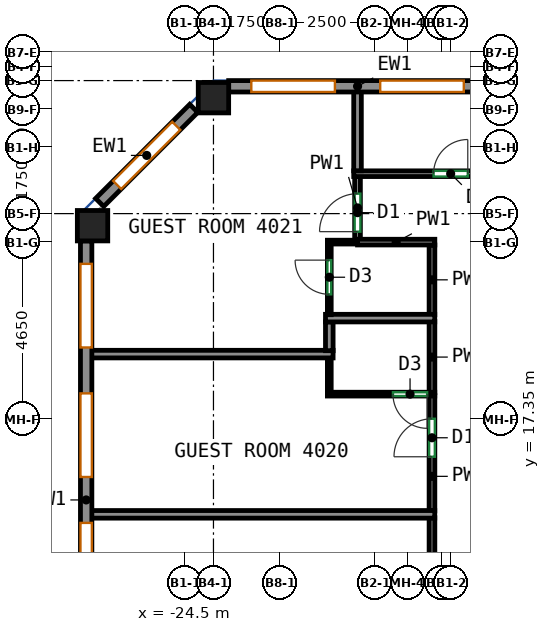
"""IFC4 building model, lengths in metres.
Left out: names, types, materials, properties, quantities, classifications, styles, units other than length and angle.
Written with IfcOpenShell. Run it as: python <this file> out.ifc"""

import sys

from ifc_helpers import new_model, si_unit, direction, frame, frame_2d, origin, origin_2d, place, context, subcontext, project, spatial, rectangle, extrude, source, transform, mapped, element, fill, save


model = new_model("IFC4")
c1 = context("Model", 3, precision=1e-05, world=origin(), true_north=direction((0.0, 1.0)))
c2 = subcontext(c1, "Body", "Model", "MODEL_VIEW")
j1 = project(units=[si_unit("LENGTHUNIT", "METRE"), si_unit("PLANEANGLEUNIT", "RADIAN")], contexts=[c1])
p1 = place(None, origin())
s1 = spatial("IfcSite", under=j1, at=p1, CompositionType="ELEMENT")
p2 = place(p1, origin())
s2 = spatial("IfcBuilding", under=s1, at=p2, CompositionType="ELEMENT")
p3 = place(p2, frame((0.0, 0.0, 171.9)))
s3 = spatial("IfcBuildingStorey", under=s2, at=p3, CompositionType="ELEMENT", Elevation=171.9)
m1 = source(origin(), c2, "Body", "SweptSolid", [
    extrude(rectangle(XDim=0.8, YDim=0.8, at=origin_2d()), origin(), (0.0, 0.0, 1.0), 3.12),
])
for number, where, z_axis, x_axis in (
    (1, (-26.932, 22.432, 0.0), (0.0, 0.0, 1.0), (1.0, 0.0, 0.0)),
    (2, (-23.75, 25.8, 0.0), (0.0, 0.0, 1.0), (1.0, 0.0, 0.0)),
):
    element("IfcColumn", number, at=place(p3, frame(where, z_axis=z_axis, x_axis=x_axis)), inside=s3, PredefinedType="COLUMN", context=c2, shape_type="MappedRepresentation", body=[
        mapped(m1, transform((0.0, 0.0, 0.0))),
    ])
m2 = source(origin(), c2, "Body", "SweptSolid", [
    extrude(rectangle(XDim=6.783, YDim=0.3, at=frame_2d((3.392, 0.0))), origin(), (0.0, 0.0, 1.0), 3.12),
])
p4 = place(p3, frame((-16.567, 26.1, 0.0), z_axis=(0.0, 0.0, 1.0), x_axis=(-1.0, 0.0, 0.0)))
e3 = element("IfcWall", 3, at=p4, inside=s3, PredefinedType="SOLIDWALL", context=c2, shape_type="MappedRepresentation", body=[
    mapped(m2, transform((0.0, 0.0, 0.0))),
])
p5 = place(p4, frame((0.596, 0.0, 0.85)))
e4 = element("IfcOpeningElement", 4, at=p5, cuts=e3, PredefinedType="OPENING", context=c2, shape_type="SweptSolid", body=[
    extrude(rectangle(XDim=2.2, YDim=1.95, at=frame_2d((1.1, 0.975))), frame((0.0, 0.16, 0.0), z_axis=(0.0, -1.0, 0.0), x_axis=(1.0, 0.0, 0.0)), (0.0, 0.0, 1.0), 0.32),
])
p6 = place(p4, frame((3.988, 0.0, 0.85)))
e5 = element("IfcOpeningElement", 5, at=p6, cuts=e3, PredefinedType="OPENING", context=c2, shape_type="SweptSolid", body=[
    extrude(rectangle(XDim=2.2, YDim=1.95, at=frame_2d((1.1, 0.975))), frame((0.0, 0.16, 0.0), z_axis=(0.0, -1.0, 0.0), x_axis=(1.0, 0.0, 0.0)), (0.0, 0.0, 1.0), 0.32),
])
m3 = source(origin(), c2, "Body", "SweptSolid", [
    extrude(rectangle(XDim=3.5, YDim=0.3, at=frame_2d((1.75, 0.0))), origin(), (0.0, 0.0, 1.0), 3.12),
])
p7 = place(p3, frame((-24.269, 25.519, 0.0), z_axis=(0.0, 0.0, 1.0), x_axis=(-0.707141656123, -0.70707190453, 0.0)))
e6 = element("IfcWall", 6, at=p7, inside=s3, PredefinedType="SOLIDWALL", context=c2, shape_type="MappedRepresentation", body=[
    mapped(m3, transform((0.0, 0.0, 0.0))),
])
p8 = place(p7, frame((0.65, 0.0, 0.85)))
e7 = element("IfcOpeningElement", 7, at=p8, cuts=e6, PredefinedType="OPENING", context=c2, shape_type="SweptSolid", body=[
    extrude(rectangle(XDim=2.2, YDim=1.95, at=frame_2d((1.1, 0.975))), frame((0.0, 0.16, 0.0), z_axis=(0.0, -1.0, 0.0), x_axis=(1.0, 0.0, 0.0)), (0.0, 0.0, 1.0), 0.32),
])
m4 = source(origin(), c2, "Body", "SweptSolid", [
    extrude(rectangle(XDim=13.632, YDim=0.3, at=frame_2d((6.816, 0.0))), origin(), (0.0, 0.0, 1.0), 3.12),
])
p9 = place(p3, frame((-27.1, 22.032, 0.0), z_axis=(0.0, 0.0, 1.0), x_axis=(0.0, -1.0, 0.0)))
e8 = element("IfcWall", 8, at=p9, inside=s3, PredefinedType="SOLIDWALL", context=c2, shape_type="MappedRepresentation", body=[
    mapped(m4, transform((0.0, 0.0, 0.0))),
])
p10 = place(p9, frame((0.604, 0.0, 0.85)))
e9 = element("IfcOpeningElement", 9, at=p10, cuts=e8, PredefinedType="OPENING", context=c2, shape_type="SweptSolid", body=[
    extrude(rectangle(XDim=2.2, YDim=1.95, at=frame_2d((1.1, 0.975))), frame((0.0, 0.16, 0.0), z_axis=(0.0, -1.0, 0.0), x_axis=(1.0, 0.0, 0.0)), (0.0, 0.0, 1.0), 0.32),
])
p11 = place(p9, frame((4.012, 0.0, 0.85)))
e10 = element("IfcOpeningElement", 10, at=p11, cuts=e8, PredefinedType="OPENING", context=c2, shape_type="SweptSolid", body=[
    extrude(rectangle(XDim=2.2, YDim=1.95, at=frame_2d((1.1, 0.975))), frame((0.0, 0.16, 0.0), z_axis=(0.0, -1.0, 0.0), x_axis=(1.0, 0.0, 0.0)), (0.0, 0.0, 1.0), 0.32),
])
p12 = place(p9, frame((7.42, 0.0, 0.85)))
e11 = element("IfcOpeningElement", 11, at=p12, cuts=e8, PredefinedType="OPENING", context=c2, shape_type="SweptSolid", body=[
    extrude(rectangle(XDim=2.2, YDim=1.95, at=frame_2d((1.1, 0.975))), frame((0.0, 0.16, 0.0), z_axis=(0.0, -1.0, 0.0), x_axis=(1.0, 0.0, 0.0)), (0.0, 0.0, 1.0), 0.32),
])
p13 = place(p9, frame((10.828, 0.0, 0.85)))
e12 = element("IfcOpeningElement", 12, at=p13, cuts=e8, PredefinedType="OPENING", context=c2, shape_type="SweptSolid", body=[
    extrude(rectangle(XDim=2.2, YDim=1.95, at=frame_2d((1.1, 0.975))), frame((0.0, 0.16, 0.0), z_axis=(0.0, -1.0, 0.0), x_axis=(1.0, 0.0, 0.0)), (0.0, 0.0, 1.0), 0.32),
])
p14 = place(p3, frame((-18.0, 10.04, 0.0), z_axis=(0.0, 0.0, 1.0), x_axis=(0.0, 1.0, 0.0)))
e13 = element("IfcWall", 13, at=p14, inside=s3, PredefinedType="PARTITIONING", context=c2, shape_type="SweptSolid", body=[
    extrude(rectangle(XDim=4.707, YDim=0.15, at=frame_2d((2.354, 0.0))), origin(), (0.0, 0.0, 1.0), 3.12),
])
p15 = place(p14, frame((0.501, 0.0, 0.0)))
e14 = element("IfcOpeningElement", 14, at=p15, cuts=e13, PredefinedType="OPENING", context=c2, shape_type="SweptSolid", body=[
    extrude(rectangle(XDim=1.0, YDim=2.1, at=frame_2d((0.5, 1.05))), frame((0.0, 0.085, 0.0), z_axis=(0.0, -1.0, 0.0), x_axis=(1.0, 0.0, 0.0)), (0.0, 0.0, 1.0), 0.17),
])
p16 = place(p3, frame((-18.0, 14.927, 0.0), z_axis=(0.0, 0.0, 1.0), x_axis=(0.0, 1.0, 0.0)))
e15 = element("IfcWall", 15, at=p16, inside=s3, PredefinedType="PARTITIONING", context=c2, shape_type="SweptSolid", body=[
    extrude(rectangle(XDim=3.033, YDim=0.15, at=frame_2d((1.517, 0.0))), origin(), (0.0, 0.0, 1.0), 3.12),
])
p17 = place(p16, frame((1.425, 0.0, 0.0)))
e16 = element("IfcOpeningElement", 16, at=p17, cuts=e15, PredefinedType="OPENING", context=c2, shape_type="SweptSolid", body=[
    extrude(rectangle(XDim=1.0, YDim=2.1, at=frame_2d((0.5, 1.05))), frame((0.0, 0.085, 0.0), z_axis=(0.0, -1.0, 0.0), x_axis=(1.0, 0.0, 0.0)), (0.0, 0.0, 1.0), 0.17),
])
p18 = place(p3, frame((-18.0, 18.04, 0.0), z_axis=(0.0, 0.0, 1.0), x_axis=(0.0, 1.0, 0.0)))
e17 = element("IfcWall", 17, at=p18, inside=s3, PredefinedType="PARTITIONING", context=c2, shape_type="SweptSolid", body=[
    extrude(rectangle(XDim=1.87, YDim=0.15, at=frame_2d((0.935, 0.0))), origin(), (0.0, 0.0, 1.0), 3.12),
])
p19 = place(p3, frame((-19.959, 22.075, 0.0), z_axis=(0.0, 0.0, 1.0), x_axis=(0.0, 1.0, 0.0)))
e18 = element("IfcWall", 18, at=p19, inside=s3, PredefinedType="PARTITIONING", context=c2, shape_type="SweptSolid", body=[
    extrude(rectangle(XDim=1.65, YDim=0.15, at=frame_2d((0.825, 0.0))), origin(), (0.0, 0.0, 1.0), 3.12),
])
p20 = place(p19, frame((0.2, 0.0, 0.0)))
e19 = element("IfcOpeningElement", 19, at=p20, cuts=e18, PredefinedType="OPENING", context=c2, shape_type="SweptSolid", body=[
    extrude(rectangle(XDim=1.0, YDim=2.1, at=frame_2d((0.5, 1.05))), frame((0.0, 0.085, 0.0), z_axis=(0.0, -1.0, 0.0), x_axis=(1.0, 0.0, 0.0)), (0.0, 0.0, 1.0), 0.17),
])
p21 = place(p3, frame((-18.0, 20.09, 0.0), z_axis=(0.0, 0.0, 1.0), x_axis=(0.0, 1.0, 0.0)))
e20 = element("IfcWall", 20, at=p21, inside=s3, PredefinedType="PARTITIONING", context=c2, shape_type="SweptSolid", body=[
    extrude(rectangle(XDim=1.835, YDim=0.15, at=frame_2d((0.917, 0.0))), origin(), (0.0, 0.0, 1.0), 3.12),
])
p22 = place(p3, frame((-19.959, 22.0, 0.0), z_axis=(0.0, 0.0, 1.0), x_axis=(1.0, 0.0, 0.0)))
e21 = element("IfcWall", 21, at=p22, inside=s3, PredefinedType="PARTITIONING", context=c2, shape_type="SweptSolid", body=[
    extrude(rectangle(XDim=2.034, YDim=0.15, at=frame_2d((1.017, 0.0))), origin(), (0.0, 0.0, 1.0), 3.12),
])
p23 = place(p3, frame((-20.059, 23.8, 0.0), z_axis=(0.0, 0.0, 1.0), x_axis=(1.0, 0.0, 0.0)))
e22 = element("IfcWall", 22, at=p23, inside=s3, PredefinedType="PARTITIONING", context=c2, shape_type="SweptSolid", body=[
    extrude(rectangle(XDim=41.909, YDim=0.15, at=frame_2d((20.955, 0.0))), origin(), (0.0, 0.0, 1.0), 3.12),
])
p24 = place(p23, frame((2.101, 0.0, 0.0)))
e23 = element("IfcOpeningElement", 23, at=p24, cuts=e22, PredefinedType="OPENING", context=c2, shape_type="SweptSolid", body=[
    extrude(rectangle(XDim=0.9, YDim=2.1, at=frame_2d((0.45, 1.05))), frame((0.0, 0.085, 0.0), z_axis=(0.0, -1.0, 0.0), x_axis=(1.0, 0.0, 0.0)), (0.0, 0.0, 1.0), 0.17),
])
p25 = place(p23, frame((4.585, 0.0, 0.0)))
e24 = element("IfcOpeningElement", 24, at=p25, cuts=e22, PredefinedType="OPENING", context=c2, shape_type="SweptSolid", body=[
    extrude(rectangle(XDim=1.0, YDim=2.1, at=frame_2d((0.5, 1.05))), frame((0.0, 0.085, 0.0), z_axis=(0.0, -1.0, 0.0), x_axis=(1.0, 0.0, 0.0)), (0.0, 0.0, 1.0), 0.17),
])
p26 = place(p23, frame((8.175, 0.0, 0.0)))
e25 = element("IfcOpeningElement", 25, at=p26, cuts=e22, PredefinedType="OPENING", context=c2, shape_type="SweptSolid", body=[
    extrude(rectangle(XDim=0.9, YDim=2.1, at=frame_2d((0.45, 1.05))), frame((0.0, 0.085, 0.0), z_axis=(0.0, -1.0, 0.0), x_axis=(1.0, 0.0, 0.0)), (0.0, 0.0, 1.0), 0.17),
])
p27 = place(p23, frame((13.173, 0.0, 0.0)))
e26 = element("IfcOpeningElement", 26, at=p27, cuts=e22, PredefinedType="OPENING", context=c2, shape_type="SweptSolid", body=[
    extrude(rectangle(XDim=1.0, YDim=2.1, at=frame_2d((0.5, 1.05))), frame((0.0, 0.085, 0.0), z_axis=(0.0, -1.0, 0.0), x_axis=(1.0, 0.0, 0.0)), (0.0, 0.0, 1.0), 0.17),
])
p28 = place(p23, frame((15.658, 0.0, 0.0)))
e27 = element("IfcOpeningElement", 27, at=p28, cuts=e22, PredefinedType="OPENING", context=c2, shape_type="SweptSolid", body=[
    extrude(rectangle(XDim=0.9, YDim=2.1, at=frame_2d((0.45, 1.05))), frame((0.0, 0.085, 0.0), z_axis=(0.0, -1.0, 0.0), x_axis=(1.0, 0.0, 0.0)), (0.0, 0.0, 1.0), 0.17),
])
p29 = place(p23, frame((21.315, 0.0, 0.0)))
e28 = element("IfcOpeningElement", 28, at=p29, cuts=e22, PredefinedType="OPENING", context=c2, shape_type="SweptSolid", body=[
    extrude(rectangle(XDim=0.9, YDim=2.1, at=frame_2d((0.45, 1.05))), frame((0.0, 0.085, 0.0), z_axis=(0.0, -1.0, 0.0), x_axis=(1.0, 0.0, 0.0)), (0.0, 0.0, 1.0), 0.17),
])
p30 = place(p23, frame((24.625, 0.0, 0.0)))
e29 = element("IfcOpeningElement", 29, at=p30, cuts=e22, PredefinedType="OPENING", context=c2, shape_type="SweptSolid", body=[
    extrude(rectangle(XDim=1.0, YDim=2.1, at=frame_2d((0.5, 1.05))), frame((0.0, 0.085, 0.0), z_axis=(0.0, -1.0, 0.0), x_axis=(1.0, 0.0, 0.0)), (0.0, 0.0, 1.0), 0.17),
])
p31 = place(p23, frame((29.043, 0.0, 0.0)))
e30 = element("IfcOpeningElement", 30, at=p31, cuts=e22, PredefinedType="OPENING", context=c2, shape_type="SweptSolid", body=[
    extrude(rectangle(XDim=0.9, YDim=2.1, at=frame_2d((0.45, 1.05))), frame((0.0, 0.085, 0.0), z_axis=(0.0, -1.0, 0.0), x_axis=(1.0, 0.0, 0.0)), (0.0, 0.0, 1.0), 0.17),
])
p32 = place(p23, frame((32.735, 0.0, 0.0)))
e31 = element("IfcOpeningElement", 31, at=p32, cuts=e22, PredefinedType="OPENING", context=c2, shape_type="SweptSolid", body=[
    extrude(rectangle(XDim=1.0, YDim=2.1, at=frame_2d((0.5, 1.05))), frame((0.0, 0.085, 0.0), z_axis=(0.0, -1.0, 0.0), x_axis=(1.0, 0.0, 0.0)), (0.0, 0.0, 1.0), 0.17),
])
p33 = place(p23, frame((36.627, 0.0, 0.0)))
e32 = element("IfcOpeningElement", 32, at=p33, cuts=e22, PredefinedType="OPENING", context=c2, shape_type="SweptSolid", body=[
    extrude(rectangle(XDim=0.9, YDim=2.1, at=frame_2d((0.45, 1.05))), frame((0.0, 0.085, 0.0), z_axis=(0.0, -1.0, 0.0), x_axis=(1.0, 0.0, 0.0)), (0.0, 0.0, 1.0), 0.17),
])
p34 = place(p23, frame((38.808, 0.0, 0.0)))
e33 = element("IfcOpeningElement", 33, at=p34, cuts=e22, PredefinedType="OPENING", context=c2, shape_type="SweptSolid", body=[
    extrude(rectangle(XDim=0.9, YDim=2.1, at=frame_2d((0.45, 1.05))), frame((0.0, 0.085, 0.0), z_axis=(0.0, -1.0, 0.0), x_axis=(1.0, 0.0, 0.0)), (0.0, 0.0, 1.0), 0.17),
])
p35 = place(p3, frame((-17.927, 14.837, 0.0), z_axis=(0.0, 0.0, 1.0), x_axis=(-1.0, 0.0, 0.0)))
e34 = element("IfcWall", 34, at=p35, inside=s3, PredefinedType="PARTITIONING", context=c2, shape_type="SweptSolid", body=[
    extrude(rectangle(XDim=9.073, YDim=0.2, at=frame_2d((4.537, 0.0))), origin(), (0.0, 0.0, 1.0), 3.12),
])
p36 = place(p3, frame((-17.927, 18.0, 0.0), z_axis=(0.0, 0.0, 1.0), x_axis=(-1.0, 0.0, 0.0)))
e35 = element("IfcWall", 35, at=p36, inside=s3, PredefinedType="PARTITIONING", context=c2, shape_type="SweptSolid", body=[
    extrude(rectangle(XDim=2.825, YDim=0.1, at=frame_2d((1.413, 0.0))), origin(), (0.0, 0.0, 1.0), 3.12),
])
p37 = place(p36, frame((0.2, 0.0, 0.0)))
e36 = element("IfcOpeningElement", 36, at=p37, cuts=e35, PredefinedType="OPENING", context=c2, shape_type="SweptSolid", body=[
    extrude(rectangle(XDim=0.9, YDim=2.1, at=frame_2d((0.45, 1.05))), frame((0.0, 0.06, 0.0), z_axis=(0.0, -1.0, 0.0), x_axis=(1.0, 0.0, 0.0)), (0.0, 0.0, 1.0), 0.12),
])
p38 = place(p3, frame((-20.702, 18.05, 0.0), z_axis=(0.0, 0.0, 1.0), x_axis=(0.0, 1.0, 0.0)))
e37 = element("IfcWall", 37, at=p38, inside=s3, PredefinedType="PARTITIONING", context=c2, shape_type="SweptSolid", body=[
    extrude(rectangle(XDim=0.903, YDim=0.1, at=frame_2d((0.451, 0.0))), origin(), (0.0, 0.0, 1.0), 3.12),
])
p39 = place(p3, frame((-20.602, 19.053, 0.0), z_axis=(0.0, 0.0, 1.0), x_axis=(-1.0, 0.0, 0.0)))
e38 = element("IfcWall", 38, at=p39, inside=s3, PredefinedType="PARTITIONING", context=c2, shape_type="SweptSolid", body=[
    extrude(rectangle(XDim=6.398, YDim=0.2, at=frame_2d((3.199, 0.0))), origin(), (0.0, 0.0, 1.0), 3.12),
])
p40 = place(p3, frame((-20.702, 19.9, 0.0), z_axis=(0.0, 0.0, 1.0), x_axis=(0.0, -1.0, 0.0)))
e39 = element("IfcWall", 39, at=p40, inside=s3, PredefinedType="PARTITIONING", context=c2, shape_type="SweptSolid", body=[
    extrude(rectangle(XDim=0.757, YDim=0.2, at=frame_2d((0.378, 0.0))), origin(), (0.0, 0.0, 1.0), 3.12),
])
p41 = place(p3, frame((-17.927, 20.0, 0.0), z_axis=(0.0, 0.0, 1.0), x_axis=(-1.0, 0.0, 0.0)))
e40 = element("IfcWall", 40, at=p41, inside=s3, PredefinedType="PARTITIONING", context=c2, shape_type="SweptSolid", body=[
    extrude(rectangle(XDim=2.875, YDim=0.2, at=frame_2d((1.438, 0.0))), origin(), (0.0, 0.0, 1.0), 3.12),
])
p42 = place(p3, frame((-20.752, 22.0, 0.0), z_axis=(0.0, 0.0, 1.0), x_axis=(1.0, 0.0, 0.0)))
e41 = element("IfcWall", 41, at=p42, inside=s3, PredefinedType="PARTITIONING", context=c2, shape_type="SweptSolid", body=[
    extrude(rectangle(XDim=0.791, YDim=0.1, at=frame_2d((0.396, 0.0))), origin(), (0.0, 0.0, 1.0), 3.12),
])
p43 = place(p3, frame((-20.702, 20.09, 0.0), z_axis=(0.0, 0.0, 1.0), x_axis=(0.0, 1.0, 0.0)))
e42 = element("IfcWall", 42, at=p43, inside=s3, PredefinedType="PARTITIONING", context=c2, shape_type="SweptSolid", body=[
    extrude(rectangle(XDim=1.86, YDim=0.1, at=frame_2d((0.93, 0.0))), origin(), (0.0, 0.0, 1.0), 3.12),
])
p44 = place(p43, frame((0.536, 0.0, 0.0)))
e43 = element("IfcOpeningElement", 43, at=p44, cuts=e42, PredefinedType="OPENING", context=c2, shape_type="SweptSolid", body=[
    extrude(rectangle(XDim=0.9, YDim=2.1, at=frame_2d((0.45, 1.05))), frame((0.0, 0.06, 0.0), z_axis=(0.0, -1.0, 0.0), x_axis=(1.0, 0.0, 0.0)), (0.0, 0.0, 1.0), 0.12),
])
p45 = place(p3, frame((-19.959, 23.877, 0.0), z_axis=(0.0, 0.0, 1.0), x_axis=(0.0, 1.0, 0.0)))
e44 = element("IfcWall", 44, at=p45, inside=s3, PredefinedType="PARTITIONING", context=c2, shape_type="SweptSolid", body=[
    extrude(rectangle(XDim=2.123, YDim=0.2, at=frame_2d((1.062, 0.0))), origin(), (0.0, 0.0, 1.0), 3.12),
])
p46 = place(p5, origin())
e45 = element("IfcWindow", 45, at=p46, inside=s3, PartitioningType="SINGLE_PANEL", PredefinedType="WINDOW", context=c2, shape_type="SweptSolid", body=[
    extrude(rectangle(XDim=2.2, YDim=1.95, at=frame_2d((1.1, 0.975))), frame((0.0, 0.03, 0.0), z_axis=(0.0, -1.0, 0.0), x_axis=(1.0, 0.0, 0.0)), (0.0, 0.0, 1.0), 0.06),
])
fill(e4, e45)
p47 = place(p6, origin())
e46 = element("IfcWindow", 46, at=p47, inside=s3, PartitioningType="SINGLE_PANEL", PredefinedType="WINDOW", context=c2, shape_type="SweptSolid", body=[
    extrude(rectangle(XDim=2.2, YDim=1.95, at=frame_2d((1.1, 0.975))), frame((0.0, 0.03, 0.0), z_axis=(0.0, -1.0, 0.0), x_axis=(1.0, 0.0, 0.0)), (0.0, 0.0, 1.0), 0.06),
])
fill(e5, e46)
p48 = place(p8, origin())
e47 = element("IfcWindow", 47, at=p48, inside=s3, PartitioningType="SINGLE_PANEL", PredefinedType="WINDOW", context=c2, shape_type="SweptSolid", body=[
    extrude(rectangle(XDim=2.2, YDim=1.95, at=frame_2d((1.1, 0.975))), frame((0.0, 0.03, 0.0), z_axis=(0.0, -1.0, 0.0), x_axis=(1.0, 0.0, 0.0)), (0.0, 0.0, 1.0), 0.06),
])
fill(e7, e47)
p49 = place(p10, origin())
e48 = element("IfcWindow", 48, at=p49, inside=s3, PartitioningType="SINGLE_PANEL", PredefinedType="WINDOW", context=c2, shape_type="SweptSolid", body=[
    extrude(rectangle(XDim=2.2, YDim=1.95, at=frame_2d((1.1, 0.975))), frame((0.0, 0.03, 0.0), z_axis=(0.0, -1.0, 0.0), x_axis=(1.0, 0.0, 0.0)), (0.0, 0.0, 1.0), 0.06),
])
fill(e9, e48)
p50 = place(p11, origin())
e49 = element("IfcWindow", 49, at=p50, inside=s3, PartitioningType="SINGLE_PANEL", PredefinedType="WINDOW", context=c2, shape_type="SweptSolid", body=[
    extrude(rectangle(XDim=2.2, YDim=1.95, at=frame_2d((1.1, 0.975))), frame((0.0, 0.03, 0.0), z_axis=(0.0, -1.0, 0.0), x_axis=(1.0, 0.0, 0.0)), (0.0, 0.0, 1.0), 0.06),
])
fill(e10, e49)
p51 = place(p12, origin())
e50 = element("IfcWindow", 50, at=p51, inside=s3, PartitioningType="SINGLE_PANEL", PredefinedType="WINDOW", context=c2, shape_type="SweptSolid", body=[
    extrude(rectangle(XDim=2.2, YDim=1.95, at=frame_2d((1.1, 0.975))), frame((0.0, 0.03, 0.0), z_axis=(0.0, -1.0, 0.0), x_axis=(1.0, 0.0, 0.0)), (0.0, 0.0, 1.0), 0.06),
])
fill(e11, e50)
p52 = place(p17, origin())
e51 = element("IfcDoor", 51, at=p52, inside=s3, OperationType="SINGLE_SWING_LEFT", PredefinedType="DOOR", context=c2, shape_type="SweptSolid", body=[
    extrude(rectangle(XDim=1.0, YDim=2.1, at=frame_2d((0.5, 1.05))), frame((0.0, 0.025, 0.0), z_axis=(0.0, -1.0, 0.0), x_axis=(1.0, 0.0, 0.0)), (0.0, 0.0, 1.0), 0.05),
])
fill(e16, e51)
p53 = place(p37, origin())
e52 = element("IfcDoor", 52, at=p53, inside=s3, OperationType="SINGLE_SWING_LEFT", PredefinedType="DOOR", context=c2, shape_type="SweptSolid", body=[
    extrude(rectangle(XDim=0.9, YDim=2.1, at=frame_2d((0.45, 1.05))), frame((0.0, 0.025, 0.0), z_axis=(0.0, -1.0, 0.0), x_axis=(1.0, 0.0, 0.0)), (0.0, 0.0, 1.0), 0.05),
])
fill(e36, e52)
p54 = place(p44, origin())
e53 = element("IfcDoor", 53, at=p54, inside=s3, OperationType="SINGLE_SWING_RIGHT", PredefinedType="DOOR", context=c2, shape_type="SweptSolid", body=[
    extrude(rectangle(XDim=0.9, YDim=2.1, at=frame_2d((0.45, 1.05))), frame((0.0, 0.025, 0.0), z_axis=(0.0, -1.0, 0.0), x_axis=(1.0, 0.0, 0.0)), (0.0, 0.0, 1.0), 0.05),
])
fill(e43, e53)
p55 = place(p20, origin())
e54 = element("IfcDoor", 54, at=p55, inside=s3, OperationType="SINGLE_SWING_LEFT", PredefinedType="DOOR", context=c2, shape_type="SweptSolid", body=[
    extrude(rectangle(XDim=1.0, YDim=2.1, at=frame_2d((0.5, 1.05))), frame((0.0, 0.025, 0.0), z_axis=(0.0, -1.0, 0.0), x_axis=(1.0, 0.0, 0.0)), (0.0, 0.0, 1.0), 0.05),
])
fill(e19, e54)
p56 = place(p24, origin())
e55 = element("IfcDoor", 55, at=p56, inside=s3, OperationType="SINGLE_SWING_RIGHT", PredefinedType="DOOR", context=c2, shape_type="SweptSolid", body=[
    extrude(rectangle(XDim=0.9, YDim=2.1, at=frame_2d((0.45, 1.05))), frame((0.0, 0.025, 0.0), z_axis=(0.0, -1.0, 0.0), x_axis=(1.0, 0.0, 0.0)), (0.0, 0.0, 1.0), 0.05),
])
fill(e23, e55)
save(model, sys.argv[1])
